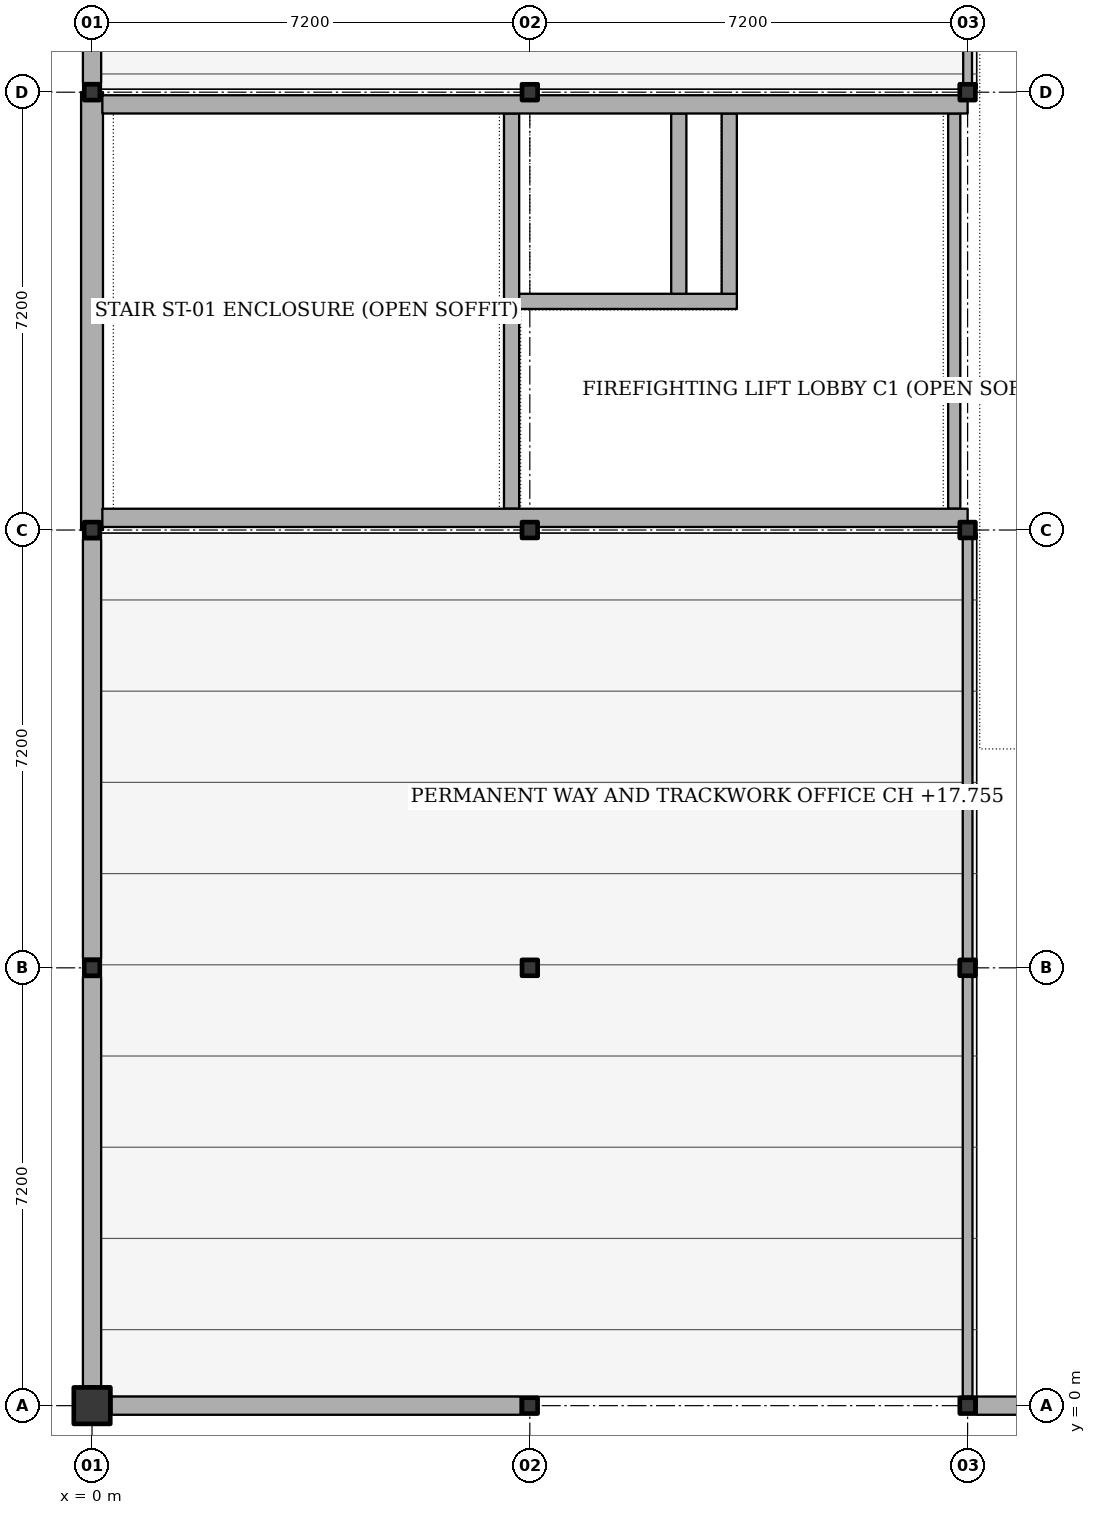
"""IFC4 building model, lengths in metres.
Left out: names, types, materials, properties, quantities, classifications, styles, units other than length and angle.
Written with IfcOpenShell. Run it as: python <this file> out.ifc"""

import sys

from ifc_helpers import new_model, si_unit, direction, frame, frame_2d, origin, origin_with_axes, origin_2d, place, context, subcontext, project, spatial, rectangle, i_section, extrude, element, fill, save


model = new_model("IFC4")
c1 = context("Model", 3, precision=1e-05, world=origin(), true_north=direction((0.0, 1.0)))
c2 = subcontext(c1, "Body", "Model", "MODEL_VIEW")
j1 = project(units=[si_unit("LENGTHUNIT", "METRE"), si_unit("PLANEANGLEUNIT", "RADIAN")], contexts=[c1])
p1 = place(None, origin())
s1 = spatial("IfcSite", under=j1, at=p1, CompositionType="ELEMENT")
p2 = place(p1, origin())
s2 = spatial("IfcBuilding", under=s1, at=p2, CompositionType="ELEMENT")
p3 = place(p2, frame((0.0, 0.0, 14.4)))
s3 = spatial("IfcBuildingStorey", under=s2, at=p3, CompositionType="ELEMENT", Elevation=14.4)
p4 = place(p3, origin_with_axes())
e1 = element("IfcColumn", 1, at=p4, inside=s3, PredefinedType="COLUMN", context=c2, shape_type="SweptSolid", body=[
    extrude(rectangle(XDim=0.6, YDim=0.6, at=origin_2d()), origin(), (0.0, 0.0, 1.0), 4.5),
])
for number, where, z_axis, x_axis in (
    (2, (0.0, 7.2, 0.0), (0.0, 0.0, 1.0), (1.0, 0.0, 0.0)),
    (3, (0.0, 14.4, 0.0), (0.0, 0.0, 1.0), (1.0, 0.0, 0.0)),
    (4, (0.0, 21.6, 0.0), (0.0, 0.0, 1.0), (1.0, 0.0, 0.0)),
    (5, (7.2, 0.0, 0.0), (0.0, 0.0, 1.0), (1.0, 0.0, 0.0)),
    (6, (7.2, 7.2, 0.0), (0.0, 0.0, 1.0), (1.0, 0.0, 0.0)),
    (7, (7.2, 14.4, 0.0), (0.0, 0.0, 1.0), (1.0, 0.0, 0.0)),
    (8, (7.2, 21.6, 0.0), (0.0, 0.0, 1.0), (1.0, 0.0, 0.0)),
    (9, (14.4, 0.0, 0.0), (0.0, 0.0, 1.0), (1.0, 0.0, 0.0)),
    (10, (14.4, 7.2, 0.0), (0.0, 0.0, 1.0), (1.0, 0.0, 0.0)),
    (11, (14.4, 14.4, 0.0), (0.0, 0.0, 1.0), (1.0, 0.0, 0.0)),
    (12, (14.4, 21.6, 0.0), (0.0, 0.0, 1.0), (1.0, 0.0, 0.0)),
):
    element("IfcColumn", number, at=place(p3, frame(where, z_axis=z_axis, x_axis=x_axis)), inside=s3, PredefinedType="COLUMN", context=c2, shape_type="SweptSolid", body=[
        extrude(i_section(OverallWidth=0.256, OverallDepth=0.26, WebThickness=0.01, FlangeThickness=0.017, FilletRadius=0.013, at=origin_2d()), origin(), (0.0, 0.0, 1.0), 4.5),
    ])
p5 = place(p3, frame((0.0, 0.32, 0.0), z_axis=(0.0, 0.0, 1.0), x_axis=(0.0, 1.0, 0.0)))
e13 = element("IfcWall", 13, at=p5, inside=s3, PredefinedType="SOLIDWALL", context=c2, shape_type="SweptSolid", body=[
    extrude(rectangle(XDim=6.73, YDim=0.3, at=frame_2d((3.365, 0.0))), origin(), (0.0, 0.0, 1.0), 3.415),
])
p6 = place(p3, frame((0.0, 7.35, 0.0), z_axis=(0.0, 0.0, 1.0), x_axis=(0.0, 1.0, 0.0)))
e14 = element("IfcWall", 14, at=p6, inside=s3, PredefinedType="SOLIDWALL", context=c2, shape_type="SweptSolid", body=[
    extrude(rectangle(XDim=6.9, YDim=0.3, at=frame_2d((3.45, 0.0))), origin(), (0.0, 0.0, 1.0), 3.85),
])
p7 = place(p6, frame((2.62, 0.0, 1.05)))
e15 = element("IfcOpeningElement", 15, at=p7, cuts=e14, PredefinedType="OPENING", context=c2, shape_type="SweptSolid", body=[
    extrude(rectangle(XDim=1.66, YDim=1.8, at=frame_2d((0.83, 0.9))), frame((0.0, 0.16, 0.0), z_axis=(0.0, -1.0, 0.0), x_axis=(1.0, 0.0, 0.0)), (0.0, 0.0, 1.0), 0.32),
])
p8 = place(p3, frame((0.0, 14.4, 0.0), z_axis=(0.0, 0.0, 1.0), x_axis=(0.0, 1.0, 0.0)))
e16 = element("IfcWall", 16, at=p8, inside=s3, PredefinedType="SHEAR", context=c2, shape_type="SweptSolid", body=[
    extrude(rectangle(XDim=7.2, YDim=0.36, at=frame_2d((3.6, 0.0))), origin(), (0.0, 0.0, 1.0), 3.85),
])
p9 = place(p3, frame((0.0, 21.75, 0.0), z_axis=(0.0, 0.0, 1.0), x_axis=(0.0, 1.0, 0.0)))
e17 = element("IfcWall", 17, at=p9, inside=s3, PredefinedType="SOLIDWALL", context=c2, shape_type="SweptSolid", body=[
    extrude(rectangle(XDim=6.9, YDim=0.3, at=frame_2d((3.45, 0.0))), origin(), (0.0, 0.0, 1.0), 3.85),
])
p10 = place(p9, frame((2.17, 0.0, 1.05)))
e18 = element("IfcOpeningElement", 18, at=p10, cuts=e17, PredefinedType="OPENING", context=c2, shape_type="SweptSolid", body=[
    extrude(rectangle(XDim=2.56, YDim=1.55, at=frame_2d((1.28, 0.775))), frame((0.0, 0.16, 0.0), z_axis=(0.0, -1.0, 0.0), x_axis=(1.0, 0.0, 0.0)), (0.0, 0.0, 1.0), 0.32),
])
p11 = place(p3, frame((21.45, 0.0, 0.0), z_axis=(0.0, 0.0, 1.0), x_axis=(-1.0, 0.0, 0.0)))
e19 = element("IfcWall", 19, at=p11, inside=s3, PredefinedType="SOLIDWALL", context=c2, shape_type="SweptSolid", body=[
    extrude(rectangle(XDim=6.9, YDim=0.3, at=frame_2d((3.45, 0.0))), origin(), (0.0, 0.0, 1.0), 3.85),
])
p12 = place(p11, frame((3.72, 0.0, 1.05)))
e20 = element("IfcOpeningElement", 20, at=p12, cuts=e19, PredefinedType="OPENING", context=c2, shape_type="SweptSolid", body=[
    extrude(rectangle(XDim=2.56, YDim=1.55, at=frame_2d((1.28, 0.775))), frame((0.0, 0.16, 0.0), z_axis=(0.0, -1.0, 0.0), x_axis=(1.0, 0.0, 0.0)), (0.0, 0.0, 1.0), 0.32),
])
p13 = place(p3, frame((7.05, 0.0, 0.0), z_axis=(0.0, 0.0, 1.0), x_axis=(-1.0, 0.0, 0.0)))
e21 = element("IfcWall", 21, at=p13, inside=s3, PredefinedType="SOLIDWALL", context=c2, shape_type="SweptSolid", body=[
    extrude(rectangle(XDim=6.73, YDim=0.3, at=frame_2d((3.365, 0.0))), origin(), (0.0, 0.0, 1.0), 3.415),
])
p14 = place(p13, frame((2.315, 0.0, 1.05)))
e22 = element("IfcOpeningElement", 22, at=p14, cuts=e21, PredefinedType="OPENING", context=c2, shape_type="SweptSolid", body=[
    extrude(rectangle(XDim=2.1, YDim=1.8, at=frame_2d((1.05, 0.9))), frame((0.0, 0.16, 0.0), z_axis=(0.0, -1.0, 0.0), x_axis=(1.0, 0.0, 0.0)), (0.0, 0.0, 1.0), 0.32),
])
p15 = place(p3, frame((6.9, 14.75, 0.0), z_axis=(0.0, 0.0, 1.0), x_axis=(0.0, 1.0, 0.0)))
e23 = element("IfcWall", 23, at=p15, inside=s3, PredefinedType="SHEAR", context=c2, shape_type="SweptSolid", body=[
    extrude(rectangle(XDim=6.5, YDim=0.25, at=frame_2d((3.25, 0.0))), origin(), (0.0, 0.0, 1.0), 3.6),
])
p16 = place(p15, frame((0.95, 0.0, 0.0)))
e24 = element("IfcOpeningElement", 24, at=p16, cuts=e23, PredefinedType="OPENING", context=c2, shape_type="SweptSolid", body=[
    extrude(rectangle(XDim=1.35, YDim=2.15, at=frame_2d((0.675, 1.075))), frame((0.0, 0.135, 0.0), z_axis=(0.0, -1.0, 0.0), x_axis=(1.0, 0.0, 0.0)), (0.0, 0.0, 1.0), 0.27),
])
p17 = place(p3, frame((7.025, 18.16, 0.0), z_axis=(0.0, 0.0, 1.0), x_axis=(1.0, 0.0, 0.0)))
e25 = element("IfcWall", 25, at=p17, inside=s3, PredefinedType="SHEAR", context=c2, shape_type="SweptSolid", body=[
    extrude(rectangle(XDim=3.58, YDim=0.25, at=frame_2d((1.79, 0.0))), origin(), (0.0, 0.0, 1.0), 3.6),
])
p18 = place(p17, frame((0.775, 0.0, 0.0)))
e26 = element("IfcOpeningElement", 26, at=p18, cuts=e25, PredefinedType="OPENING", context=c2, shape_type="SweptSolid", body=[
    extrude(rectangle(XDim=1.1, YDim=2.15, at=frame_2d((0.55, 1.075))), frame((0.0, 0.135, 0.0), z_axis=(0.0, -1.0, 0.0), x_axis=(1.0, 0.0, 0.0)), (0.0, 0.0, 1.0), 0.27),
])
p19 = place(p3, frame((9.65, 18.285, 0.0), z_axis=(0.0, 0.0, 1.0), x_axis=(0.0, 1.0, 0.0)))
e27 = element("IfcWall", 27, at=p19, inside=s3, PredefinedType="SHEAR", context=c2, shape_type="SweptSolid", body=[
    extrude(rectangle(XDim=2.965, YDim=0.25, at=frame_2d((1.482, 0.0))), origin(), (0.0, 0.0, 1.0), 3.6),
])
p20 = place(p3, frame((10.48, 18.285, 0.0), z_axis=(0.0, 0.0, 1.0), x_axis=(0.0, 1.0, 0.0)))
e28 = element("IfcWall", 28, at=p20, inside=s3, PredefinedType="SHEAR", context=c2, shape_type="SweptSolid", body=[
    extrude(rectangle(XDim=2.965, YDim=0.25, at=frame_2d((1.482, 0.0))), origin(), (0.0, 0.0, 1.0), 3.6),
])
p21 = place(p20, frame((0.9, 0.0, 0.0)))
e29 = element("IfcOpeningElement", 29, at=p21, cuts=e28, PredefinedType="OPENING", context=c2, shape_type="SweptSolid", body=[
    extrude(rectangle(XDim=0.92, YDim=2.05, at=frame_2d((0.46, 1.025))), frame((0.0, 0.135, 0.0), z_axis=(0.0, -1.0, 0.0), x_axis=(1.0, 0.0, 0.0)), (0.0, 0.0, 1.0), 0.27),
])
p22 = place(p3, frame((14.18, 14.75, 0.0), z_axis=(0.0, 0.0, 1.0), x_axis=(0.0, 1.0, 0.0)))
e30 = element("IfcWall", 30, at=p22, inside=s3, PredefinedType="SOLIDWALL", context=c2, shape_type="SweptSolid", body=[
    extrude(rectangle(XDim=6.5, YDim=0.2, at=frame_2d((3.25, 0.0))), origin(), (0.0, 0.0, 1.0), 3.6),
])
p23 = place(p22, frame((2.5, 0.0, 0.0)))
e31 = element("IfcOpeningElement", 31, at=p23, cuts=e30, PredefinedType="OPENING", context=c2, shape_type="SweptSolid", body=[
    extrude(rectangle(XDim=1.5, YDim=2.15, at=frame_2d((0.75, 1.075))), frame((0.0, 0.11, 0.0), z_axis=(0.0, -1.0, 0.0), x_axis=(1.0, 0.0, 0.0)), (0.0, 0.0, 1.0), 0.22),
])
for number, where, z_axis, x_axis in (
    (32, (0.17, 14.6, 0.0), (0.0, 0.0, 1.0), (1.0, 0.0, 0.0)),
    (33, (0.17, 21.4, 0.0), (0.0, 0.0, 1.0), (1.0, 0.0, 0.0)),
):
    element("IfcWall", number, at=place(p3, frame(where, z_axis=z_axis, x_axis=x_axis)), inside=s3, PredefinedType="SHEAR", context=c2, shape_type="SweptSolid", body=[
        extrude(rectangle(XDim=14.23, YDim=0.3, at=frame_2d((7.115, 0.0))), origin(), (0.0, 0.0, 1.0), 3.6),
    ])
p24 = place(p3, frame((14.4, 0.15, 0.0), z_axis=(0.0, 0.0, 1.0), x_axis=(0.0, 1.0, 0.0)))
e34 = element("IfcWall", 34, at=p24, inside=s3, PredefinedType="PARTITIONING", context=c2, shape_type="SweptSolid", body=[
    extrude(rectangle(XDim=6.918, YDim=0.16, at=frame_2d((3.459, 0.0))), origin(), (0.0, 0.0, 1.0), 3.55),
])
p25 = place(p3, frame((14.4, 7.332, 0.0), z_axis=(0.0, 0.0, 1.0), x_axis=(0.0, 1.0, 0.0)))
e35 = element("IfcWall", 35, at=p25, inside=s3, PredefinedType="PARTITIONING", context=c2, shape_type="SweptSolid", body=[
    extrude(rectangle(XDim=6.936, YDim=0.16, at=frame_2d((3.468, 0.0))), origin(), (0.0, 0.0, 1.0), 3.55),
])
p26 = place(p25, frame((3.588, 0.0, 0.0)))
e36 = element("IfcOpeningElement", 36, at=p26, cuts=e35, PredefinedType="OPENING", context=c2, shape_type="SweptSolid", body=[
    extrude(rectangle(XDim=1.46, YDim=2.04, at=frame_2d((0.73, 1.02))), frame((0.0, 0.09, 0.0), z_axis=(0.0, -1.0, 0.0), x_axis=(1.0, 0.0, 0.0)), (0.0, 0.0, 1.0), 0.18),
])
p27 = place(p3, frame((14.4, 21.732, 0.0), z_axis=(0.0, 0.0, 1.0), x_axis=(0.0, 1.0, 0.0)))
e37 = element("IfcWall", 37, at=p27, inside=s3, PredefinedType="PARTITIONING", context=c2, shape_type="SweptSolid", body=[
    extrude(rectangle(XDim=6.936, YDim=0.145, at=frame_2d((3.468, 0.0))), origin(), (0.0, 0.0, 1.0), 3.55),
])
p28 = place(p7, origin())
e38 = element("IfcWindow", 38, at=p28, inside=s3, PartitioningType="SINGLE_PANEL", PredefinedType="WINDOW", context=c2, shape_type="SweptSolid", body=[
    extrude(rectangle(XDim=1.66, YDim=1.8, at=frame_2d((0.83, 0.9))), frame((0.0, 0.03, 0.0), z_axis=(0.0, -1.0, 0.0), x_axis=(1.0, 0.0, 0.0)), (0.0, 0.0, 1.0), 0.06),
])
fill(e15, e38)
p29 = place(p12, origin())
e39 = element("IfcWindow", 39, at=p29, inside=s3, PartitioningType="SINGLE_PANEL", PredefinedType="WINDOW", context=c2, shape_type="SweptSolid", body=[
    extrude(rectangle(XDim=2.56, YDim=1.55, at=frame_2d((1.28, 0.775))), frame((0.0, 0.03, 0.0), z_axis=(0.0, -1.0, 0.0), x_axis=(1.0, 0.0, 0.0)), (0.0, 0.0, 1.0), 0.06),
])
fill(e20, e39)
p30 = place(p14, origin())
e40 = element("IfcWindow", 40, at=p30, inside=s3, PartitioningType="SINGLE_PANEL", PredefinedType="WINDOW", context=c2, shape_type="SweptSolid", body=[
    extrude(rectangle(XDim=2.1, YDim=1.8, at=frame_2d((1.05, 0.9))), frame((0.0, 0.03, 0.0), z_axis=(0.0, -1.0, 0.0), x_axis=(1.0, 0.0, 0.0)), (0.0, 0.0, 1.0), 0.06),
])
fill(e22, e40)
p31 = place(p16, origin())
e41 = element("IfcDoor", 41, at=p31, inside=s3, OperationType="SINGLE_SWING_LEFT", PredefinedType="DOOR", context=c2, shape_type="SweptSolid", body=[
    extrude(rectangle(XDim=1.35, YDim=2.15, at=frame_2d((0.675, 1.075))), frame((0.0, 0.025, 0.0), z_axis=(0.0, -1.0, 0.0), x_axis=(1.0, 0.0, 0.0)), (0.0, 0.0, 1.0), 0.05),
])
fill(e24, e41)
p32 = place(p18, origin())
e42 = element("IfcDoor", 42, at=p32, inside=s3, OperationType="SLIDING_TO_LEFT", PredefinedType="DOOR", context=c2, shape_type="SweptSolid", body=[
    extrude(rectangle(XDim=1.1, YDim=2.15, at=frame_2d((0.55, 1.075))), frame((0.0, 0.025, 0.0), z_axis=(0.0, -1.0, 0.0), x_axis=(1.0, 0.0, 0.0)), (0.0, 0.0, 1.0), 0.05),
])
fill(e26, e42)
p33 = place(p21, origin())
e43 = element("IfcDoor", 43, at=p33, inside=s3, OperationType="SINGLE_SWING_RIGHT", PredefinedType="DOOR", context=c2, shape_type="SweptSolid", body=[
    extrude(rectangle(XDim=0.92, YDim=2.05, at=frame_2d((0.46, 1.025))), frame((0.0, 0.025, 0.0), z_axis=(0.0, -1.0, 0.0), x_axis=(1.0, 0.0, 0.0)), (0.0, 0.0, 1.0), 0.05),
])
fill(e29, e43)
p34 = place(p23, origin())
e44 = element("IfcDoor", 44, at=p34, inside=s3, OperationType="SINGLE_SWING_LEFT", PredefinedType="DOOR", context=c2, shape_type="SweptSolid", body=[
    extrude(rectangle(XDim=1.5, YDim=2.15, at=frame_2d((0.75, 1.075))), frame((0.0, 0.025, 0.0), z_axis=(0.0, -1.0, 0.0), x_axis=(1.0, 0.0, 0.0)), (0.0, 0.0, 1.0), 0.05),
])
fill(e31, e44)
p35 = place(p26, origin())
e45 = element("IfcDoor", 45, at=p35, inside=s3, OperationType="SINGLE_SWING_LEFT", PredefinedType="DOOR", context=c2, shape_type="SweptSolid", body=[
    extrude(rectangle(XDim=1.46, YDim=2.04, at=frame_2d((0.73, 1.02))), frame((0.0, 0.025, 0.0), z_axis=(0.0, -1.0, 0.0), x_axis=(1.0, 0.0, 0.0)), (0.0, 0.0, 1.0), 0.05),
])
fill(e36, e45)
save(model, sys.argv[1])
